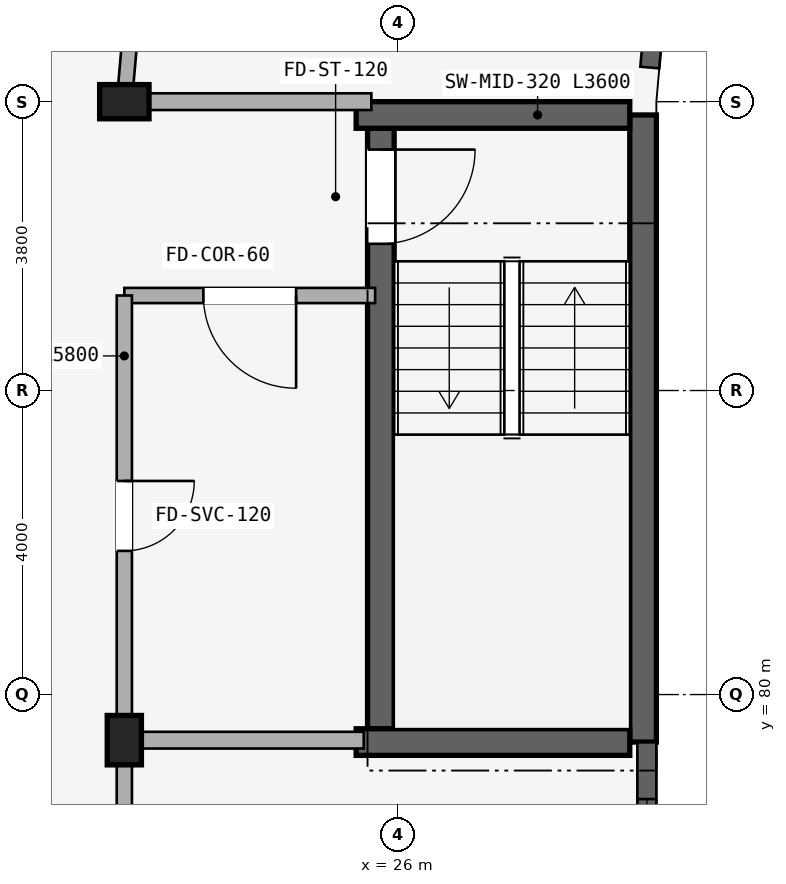
"""IFC4 building model, lengths in metres.
Left out: names, types, materials, properties, quantities, classifications, styles, units other than length and angle.
Written with IfcOpenShell. Run it as: python <this file> out.ifc"""

import sys

from ifc_helpers import new_model, si_unit, direction, frame, frame_2d, origin, origin_2d, place, context, subcontext, project, spatial, rectangle, extrude, element, fill, save


model = new_model("IFC4")
c1 = context("Model", 3, precision=1e-05, world=origin(), true_north=direction((0.0, 1.0)))
c2 = subcontext(c1, "Body", "Model", "MODEL_VIEW")
j1 = project(units=[si_unit("LENGTHUNIT", "METRE"), si_unit("PLANEANGLEUNIT", "RADIAN")], contexts=[c1])
p1 = place(None, origin())
s1 = spatial("IfcSite", under=j1, at=p1, CompositionType="ELEMENT")
p2 = place(p1, origin())
s2 = spatial("IfcBuilding", under=s1, at=p2, CompositionType="ELEMENT")
p3 = place(p2, frame((0.0, 0.0, 37.05)))
s3 = spatial("IfcBuildingStorey", under=s2, at=p3, CompositionType="ELEMENT", Elevation=37.05)
p4 = place(p3, frame((29.225, 87.625, 0.0), z_axis=(0.0, 0.0, 1.0), x_axis=(0.0, -1.0, 0.0)))
e1 = element("IfcWall", 1, at=p4, inside=s3, PredefinedType="SHEAR", context=c2, shape_type="SweptSolid", body=[
    extrude(rectangle(XDim=8.25, YDim=0.35, at=frame_2d((4.125, 0.0))), origin(), (0.0, 0.0, 1.0), 2.93),
])
p5 = place(p3, frame((25.775, 87.45, 0.0), z_axis=(0.0, 0.0, 1.0), x_axis=(0.0, -1.0, 0.0)))
e2 = element("IfcWall", 2, at=p5, inside=s3, PredefinedType="SHEAR", context=c2, shape_type="SweptSolid", body=[
    extrude(rectangle(XDim=7.9, YDim=0.35, at=frame_2d((3.95, 0.0))), origin(), (0.0, 0.0, 1.0), 2.93),
])
p6 = place(p5, frame((0.28, 0.0, 0.0)))
e3 = element("IfcOpeningElement", 3, at=p6, cuts=e2, PredefinedType="OPENING", context=c2, shape_type="SweptSolid", body=[
    extrude(rectangle(XDim=1.24, YDim=2.15, at=frame_2d((0.62, 1.075))), frame((0.0, 0.185, 0.0), z_axis=(0.0, -1.0, 0.0), x_axis=(1.0, 0.0, 0.0)), (0.0, 0.0, 1.0), 0.37),
])
for number, where, z_axis, x_axis in (
    (4, (29.05, 87.625, 0.0), (0.0, 0.0, 1.0), (-1.0, 0.0, 0.0)),
    (5, (29.05, 79.375, 0.0), (0.0, 0.0, 1.0), (-1.0, 0.0, 0.0)),
):
    element("IfcWall", number, at=place(p3, frame(where, z_axis=z_axis, x_axis=x_axis)), inside=s3, PredefinedType="SHEAR", context=c2, shape_type="SweptSolid", body=[
        extrude(rectangle(XDim=3.6, YDim=0.35, at=frame_2d((1.8, 0.0))), origin(), (0.0, 0.0, 1.0), 2.93),
    ])
for number, where, z_axis, x_axis in (
    (6, (22.4, 87.8, 0.0), (0.0, 0.0, 1.0), (0.0, 1.0, 0.0)),
    (7, (22.4, 79.4, 0.0), (0.0, 0.0, 1.0), (1.0, 0.0, 0.0)),
):
    element("IfcColumn", number, at=place(p3, frame(where, z_axis=z_axis, x_axis=x_axis)), inside=s3, PredefinedType="COLUMN", context=c2, shape_type="SweptSolid", body=[
        extrude(rectangle(XDim=0.45, YDim=0.65, at=origin_2d()), origin(), (0.0, 0.0, 1.0), 2.93),
    ])
p7 = place(p3, frame((25.7, 85.25, 0.0), z_axis=(0.0, 0.0, 1.0), x_axis=(-1.0, 0.0, 0.0)))
e8 = element("IfcWall", 8, at=p7, inside=s3, PredefinedType="STANDARD", context=c2, shape_type="SweptSolid", body=[
    extrude(rectangle(XDim=3.3, YDim=0.2, at=frame_2d((1.65, 0.0))), origin(), (0.0, 0.0, 1.0), 2.372),
])
p8 = place(p7, frame((1.04, 0.0, 0.0)))
e9 = element("IfcOpeningElement", 9, at=p8, cuts=e8, PredefinedType="OPENING", context=c2, shape_type="SweptSolid", body=[
    extrude(rectangle(XDim=1.22, YDim=2.15, at=frame_2d((0.61, 1.075))), frame((0.0, 0.11, 0.0), z_axis=(0.0, -1.0, 0.0), x_axis=(1.0, 0.0, 0.0)), (0.0, 0.0, 1.0), 0.22),
])
p9 = place(p3, frame((22.4, 85.25, 0.0), z_axis=(0.0, 0.0, 1.0), x_axis=(0.0, -1.0, 0.0)))
e10 = element("IfcWall", 10, at=p9, inside=s3, PredefinedType="STANDARD", context=c2, shape_type="SweptSolid", body=[
    extrude(rectangle(XDim=5.8, YDim=0.2, at=frame_2d((2.9, 0.0))), origin(), (0.0, 0.0, 1.0), 2.372),
])
p10 = place(p9, frame((2.44, 0.0, 0.0)))
e11 = element("IfcOpeningElement", 11, at=p10, cuts=e10, PredefinedType="OPENING", context=c2, shape_type="SweptSolid", body=[
    extrude(rectangle(XDim=0.92, YDim=2.1, at=frame_2d((0.46, 1.05))), frame((0.0, 0.11, 0.0), z_axis=(0.0, -1.0, 0.0), x_axis=(1.0, 0.0, 0.0)), (0.0, 0.0, 1.0), 0.22),
])
p11 = place(p3, frame((22.792, 92.28, 0.0), z_axis=(0.0, 0.0, 1.0), x_axis=(-0.087187153726, -0.996191949488, 0.0)))
e12 = element("IfcWall", 12, at=p11, inside=s3, PredefinedType="STANDARD", context=c2, shape_type="SweptSolid", body=[
    extrude(rectangle(XDim=4.497, YDim=0.2, at=frame_2d((2.249, 0.0))), origin(), (0.0, 0.0, 1.0), 2.372),
])
p12 = place(p3, frame((25.65, 87.8, 0.0), z_axis=(0.0, 0.0, 1.0), x_axis=(-1.0, 0.0, 0.0)))
e13 = element("IfcWall", 13, at=p12, inside=s3, PredefinedType="STANDARD", context=c2, shape_type="SweptSolid", body=[
    extrude(rectangle(XDim=3.2, YDim=0.22, at=frame_2d((1.6, 0.0))), origin(), (0.0, 0.0, 1.0), 2.372),
])
p13 = place(p3, frame((22.4, 79.4, 0.0), z_axis=(0.0, 0.0, 1.0), x_axis=(0.0, -1.0, 0.0)))
e14 = element("IfcWall", 14, at=p13, inside=s3, PredefinedType="STANDARD", context=c2, shape_type="SweptSolid", body=[
    extrude(rectangle(XDim=2.8, YDim=0.2, at=frame_2d((1.4, 0.0))), origin(), (0.0, 0.0, 1.0), 2.372),
])
p14 = place(p13, frame((0.9, 0.0, 0.0)))
e15 = element("IfcOpeningElement", 15, at=p14, cuts=e14, PredefinedType="OPENING", context=c2, shape_type="SweptSolid", body=[
    extrude(rectangle(XDim=1.0, YDim=2.15, at=frame_2d((0.5, 1.075))), frame((0.0, 0.11, 0.0), z_axis=(0.0, -1.0, 0.0), x_axis=(1.0, 0.0, 0.0)), (0.0, 0.0, 1.0), 0.22),
])
p15 = place(p3, frame((25.55, 79.4, 0.0), z_axis=(0.0, 0.0, 1.0), x_axis=(-1.0, 0.0, 0.0)))
e16 = element("IfcWall", 16, at=p15, inside=s3, PredefinedType="STANDARD", context=c2, shape_type="SweptSolid", body=[
    extrude(rectangle(XDim=3.1, YDim=0.22, at=frame_2d((1.55, 0.0))), origin(), (0.0, 0.0, 1.0), 2.372),
])
p16 = place(p3, frame((29.537, 90.798, 0.0), z_axis=(0.0, 0.0, 1.0), x_axis=(-0.087222589008, -0.996188847542, 0.0)))
e17 = element("IfcWall", 17, at=p16, inside=s3, PredefinedType="STANDARD", context=c2, shape_type="SweptSolid", body=[
    extrude(rectangle(XDim=2.558, YDim=0.25, at=frame_2d((1.279, 0.0))), origin(), (0.0, 0.0, 1.0), 2.422),
])
p17 = place(p16, frame((0.61, 0.0, 0.572)))
e18 = element("IfcOpeningElement", 18, at=p17, cuts=e17, PredefinedType="OPENING", context=c2, shape_type="SweptSolid", body=[
    extrude(rectangle(XDim=1.5, YDim=1.65, at=frame_2d((0.75, 0.825))), frame((0.0, 0.135, 0.0), z_axis=(0.0, -1.0, 0.0), x_axis=(1.0, 0.0, 0.0)), (0.0, 0.0, 1.0), 0.27),
])
p18 = place(p3, frame((29.275, 79.372, 0.0), z_axis=(0.0, 0.0, 1.0), x_axis=(0.0, -1.0, 0.0)))
e19 = element("IfcWall", 19, at=p18, inside=s3, PredefinedType="STANDARD", context=c2, shape_type="SweptSolid", body=[
    extrude(rectangle(XDim=2.468, YDim=0.25, at=frame_2d((1.234, 0.0))), origin(), (0.0, 0.0, 1.0), 2.472),
])
p19 = place(p18, frame((0.747, 0.0, 0.722)))
e20 = element("IfcOpeningElement", 20, at=p19, cuts=e19, PredefinedType="OPENING", context=c2, shape_type="SweptSolid", body=[
    extrude(rectangle(XDim=1.25, YDim=1.55, at=frame_2d((0.625, 0.775))), frame((0.0, 0.135, 0.0), z_axis=(0.0, -1.0, 0.0), x_axis=(1.0, 0.0, 0.0)), (0.0, 0.0, 1.0), 0.27),
])
p20 = place(p19, origin())
e21 = element("IfcWindow", 21, at=p20, inside=s3, PartitioningType="SINGLE_PANEL", PredefinedType="WINDOW", context=c2, shape_type="SweptSolid", body=[
    extrude(rectangle(XDim=1.25, YDim=1.55, at=frame_2d((0.625, 0.775))), frame((0.0, 0.03, 0.0), z_axis=(0.0, -1.0, 0.0), x_axis=(1.0, 0.0, 0.0)), (0.0, 0.0, 1.0), 0.06),
])
fill(e20, e21)
p21 = place(p6, origin())
e22 = element("IfcDoor", 22, at=p21, inside=s3, OperationType="SINGLE_SWING_LEFT", PredefinedType="DOOR", context=c2, shape_type="SweptSolid", body=[
    extrude(rectangle(XDim=1.24, YDim=2.15, at=frame_2d((0.62, 1.075))), frame((0.0, 0.025, 0.0), z_axis=(0.0, -1.0, 0.0), x_axis=(1.0, 0.0, 0.0)), (0.0, 0.0, 1.0), 0.05),
])
fill(e3, e22)
p22 = place(p8, origin())
e23 = element("IfcDoor", 23, at=p22, inside=s3, OperationType="SINGLE_SWING_LEFT", PredefinedType="DOOR", context=c2, shape_type="SweptSolid", body=[
    extrude(rectangle(XDim=1.22, YDim=2.15, at=frame_2d((0.61, 1.075))), frame((0.0, 0.025, 0.0), z_axis=(0.0, -1.0, 0.0), x_axis=(1.0, 0.0, 0.0)), (0.0, 0.0, 1.0), 0.05),
])
fill(e9, e23)
p23 = place(p10, frame((0.92, 0.0, 0.0), z_axis=(0.0, 0.0, 1.0), x_axis=(-1.0, 0.0, 0.0)))
e24 = element("IfcDoor", 24, at=p23, inside=s3, OperationType="SINGLE_SWING_RIGHT", PredefinedType="DOOR", context=c2, shape_type="SweptSolid", body=[
    extrude(rectangle(XDim=0.92, YDim=2.1, at=frame_2d((0.46, 1.05))), frame((0.0, 0.025, 0.0), z_axis=(0.0, -1.0, 0.0), x_axis=(1.0, 0.0, 0.0)), (0.0, 0.0, 1.0), 0.05),
])
fill(e11, e24)
save(model, sys.argv[1])
